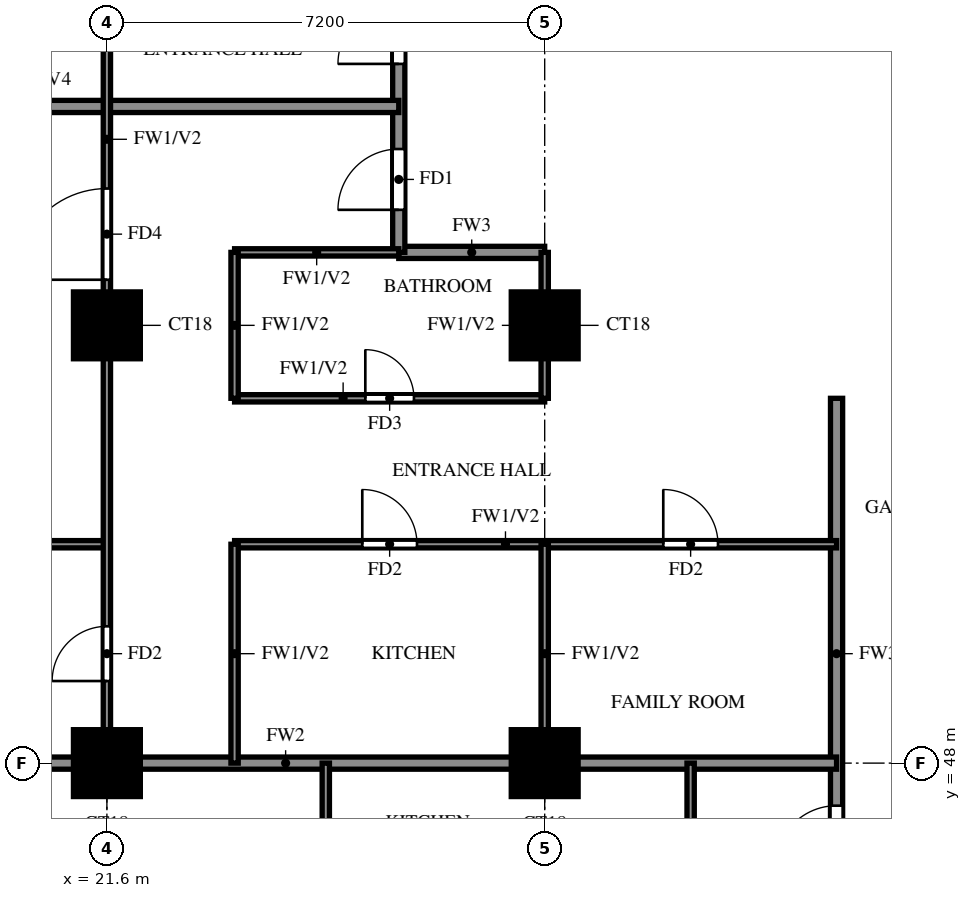
"""IFC4 building model, lengths in metres.
Left out: names, types, materials, properties, quantities, classifications, styles, units other than length and angle.
Written with IfcOpenShell. Run it as: python <this file> out.ifc"""

import sys

from ifc_helpers import new_model, si_unit, direction, frame, frame_2d, origin, origin_2d, place, context, subcontext, project, spatial, rectangle, extrude, source, transform, mapped, element, fill, save


model = new_model("IFC4")
c1 = context("Model", 3, precision=1e-05, world=origin(), true_north=direction((0.0, 1.0)))
c2 = subcontext(c1, "Body", "Model", "MODEL_VIEW")
j1 = project(units=[si_unit("LENGTHUNIT", "METRE"), si_unit("PLANEANGLEUNIT", "RADIAN")], contexts=[c1])
p1 = place(None, origin())
s1 = spatial("IfcSite", under=j1, at=p1, CompositionType="ELEMENT")
p2 = place(p1, origin())
s2 = spatial("IfcBuilding", under=s1, at=p2, CompositionType="ELEMENT")
p3 = place(p2, frame((0.0, 0.0, 130.5)))
s3 = spatial("IfcBuildingStorey", under=s2, at=p3, CompositionType="ELEMENT", Elevation=130.5)
m1 = source(origin(), c2, "Body", "SweptSolid", [
    extrude(rectangle(XDim=1.1, YDim=1.1, at=origin_2d()), origin(), (0.0, 0.0, 1.0), 3.2),
])
for number, where, z_axis, x_axis in (
    (1, (21.6, 48.0, 0.0), (0.0, 0.0, 1.0), (1.0, 0.0, 0.0)),
    (2, (28.8, 48.0, 0.0), (0.0, 0.0, 1.0), (1.0, 0.0, 0.0)),
    (3, (21.6, 55.2, 0.0), (0.0, 0.0, 1.0), (1.0, 0.0, 0.0)),
    (4, (28.8, 55.2, 0.0), (0.0, 0.0, 1.0), (1.0, 0.0, 0.0)),
):
    element("IfcColumn", number, at=place(p3, frame(where, z_axis=z_axis, x_axis=x_axis)), inside=s3, PredefinedType="COLUMN", context=c2, shape_type="MappedRepresentation", body=[
        mapped(m1, transform((0.0, 0.0, 0.0))),
    ])
p4 = place(p3, frame((26.4, 56.4, 0.0), z_axis=(0.0, 0.0, 1.0), x_axis=(1.0, 0.0, 0.0)))
e5 = element("IfcWall", 5, at=p4, inside=s3, PredefinedType="SOLIDWALL", context=c2, shape_type="SweptSolid", body=[
    extrude(rectangle(XDim=2.4, YDim=0.2, at=frame_2d((1.2, 0.0))), origin(), (0.0, 0.0, 1.0), 3.2),
])
p5 = place(p3, frame((26.4, 56.4, 0.0), z_axis=(0.0, 0.0, 1.0), x_axis=(0.0, 1.0, 0.0)))
e6 = element("IfcWall", 6, at=p5, inside=s3, PredefinedType="SOLIDWALL", context=c2, shape_type="SweptSolid", body=[
    extrude(rectangle(XDim=9.6, YDim=0.2, at=frame_2d((4.8, 0.0))), origin(), (0.0, 0.0, 1.0), 3.2),
])
p6 = place(p5, frame((0.7, 0.0, 0.0)))
e7 = element("IfcOpeningElement", 7, at=p6, cuts=e6, PredefinedType="OPENING", context=c2, shape_type="SweptSolid", body=[
    extrude(rectangle(XDim=1.0, YDim=2.1, at=frame_2d((0.5, 1.05))), frame((0.0, 0.11, 0.0), z_axis=(0.0, -1.0, 0.0), x_axis=(1.0, 0.0, 0.0)), (0.0, 0.0, 1.0), 0.22),
])
p7 = place(p5, frame((3.1, 0.0, 0.0)))
e8 = element("IfcOpeningElement", 8, at=p7, cuts=e6, PredefinedType="OPENING", context=c2, shape_type="SweptSolid", body=[
    extrude(rectangle(XDim=1.0, YDim=2.1, at=frame_2d((0.5, 1.05))), frame((0.0, 0.11, 0.0), z_axis=(0.0, -1.0, 0.0), x_axis=(1.0, 0.0, 0.0)), (0.0, 0.0, 1.0), 0.22),
])
p8 = place(p3, frame((33.6, 45.6, 0.0), z_axis=(0.0, 0.0, 1.0), x_axis=(0.0, 1.0, 0.0)))
e9 = element("IfcWall", 9, at=p8, inside=s3, PredefinedType="SOLIDWALL", context=c2, shape_type="SweptSolid", body=[
    extrude(rectangle(XDim=8.4, YDim=0.2, at=frame_2d((4.2, 0.0))), origin(), (0.0, 0.0, 1.0), 3.2),
])
p9 = place(p8, frame((0.7, 0.0, 0.0)))
e10 = element("IfcOpeningElement", 10, at=p9, cuts=e9, PredefinedType="OPENING", context=c2, shape_type="SweptSolid", body=[
    extrude(rectangle(XDim=1.0, YDim=2.1, at=frame_2d((0.5, 1.05))), frame((0.0, 0.11, 0.0), z_axis=(0.0, -1.0, 0.0), x_axis=(1.0, 0.0, 0.0)), (0.0, 0.0, 1.0), 0.22),
])
p10 = place(p3, frame((14.525, 48.0, 0.0), z_axis=(0.0, 0.0, 1.0), x_axis=(1.0, 0.0, 0.0)))
e11 = element("IfcWall", 11, at=p10, inside=s3, PredefinedType="SOLIDWALL", context=c2, shape_type="SweptSolid", body=[
    extrude(rectangle(XDim=19.075, YDim=0.2, at=frame_2d((9.538, 0.0))), origin(), (0.0, 0.0, 1.0), 3.2),
])
p11 = place(p3, frame((14.525, 58.8, 0.0), z_axis=(0.0, 0.0, 1.0), x_axis=(1.0, 0.0, 0.0)))
e12 = element("IfcWall", 12, at=p11, inside=s3, PredefinedType="SOLIDWALL", context=c2, shape_type="SweptSolid", body=[
    extrude(rectangle(XDim=11.875, YDim=0.2, at=frame_2d((5.938, 0.0))), origin(), (0.0, 0.0, 1.0), 2.3),
])
p12 = place(p3, frame((14.525, 51.6, 0.0), z_axis=(0.0, 0.0, 1.0), x_axis=(1.0, 0.0, 0.0)))
e13 = element("IfcWall", 13, at=p12, inside=s3, PredefinedType="PARTITIONING", context=c2, shape_type="SweptSolid", body=[
    extrude(rectangle(XDim=7.075, YDim=0.12, at=frame_2d((3.538, 0.0))), origin(), (0.0, 0.0, 1.0), 2.3),
])
p13 = place(p3, frame((23.7, 51.6, 0.0), z_axis=(0.0, 0.0, 1.0), x_axis=(1.0, 0.0, 0.0)))
e14 = element("IfcWall", 14, at=p13, inside=s3, PredefinedType="PARTITIONING", context=c2, shape_type="SweptSolid", body=[
    extrude(rectangle(XDim=9.9, YDim=0.12, at=frame_2d((4.95, 0.0))), origin(), (0.0, 0.0, 1.0), 3.2),
])
p14 = place(p13, frame((2.1, 0.0, 0.0)))
e15 = element("IfcOpeningElement", 15, at=p14, cuts=e14, PredefinedType="OPENING", context=c2, shape_type="SweptSolid", body=[
    extrude(rectangle(XDim=0.9, YDim=2.1, at=frame_2d((0.45, 1.05))), frame((0.0, 0.07, 0.0), z_axis=(0.0, -1.0, 0.0), x_axis=(1.0, 0.0, 0.0)), (0.0, 0.0, 1.0), 0.14),
])
p15 = place(p13, frame((7.05, 0.0, 0.0)))
e16 = element("IfcOpeningElement", 16, at=p15, cuts=e14, PredefinedType="OPENING", context=c2, shape_type="SweptSolid", body=[
    extrude(rectangle(XDim=0.9, YDim=2.1, at=frame_2d((0.45, 1.05))), frame((0.0, 0.07, 0.0), z_axis=(0.0, -1.0, 0.0), x_axis=(1.0, 0.0, 0.0)), (0.0, 0.0, 1.0), 0.14),
])
p16 = place(p3, frame((23.7, 54.0, 0.0), z_axis=(0.0, 0.0, 1.0), x_axis=(1.0, 0.0, 0.0)))
e17 = element("IfcWall", 17, at=p16, inside=s3, PredefinedType="PARTITIONING", context=c2, shape_type="SweptSolid", body=[
    extrude(rectangle(XDim=5.1, YDim=0.12, at=frame_2d((2.55, 0.0))), origin(), (0.0, 0.0, 1.0), 3.2),
])
p17 = place(p16, frame((2.15, 0.0, 0.0)))
e18 = element("IfcOpeningElement", 18, at=p17, cuts=e17, PredefinedType="OPENING", context=c2, shape_type="SweptSolid", body=[
    extrude(rectangle(XDim=0.8, YDim=2.1, at=frame_2d((0.4, 1.05))), frame((0.0, 0.07, 0.0), z_axis=(0.0, -1.0, 0.0), x_axis=(1.0, 0.0, 0.0)), (0.0, 0.0, 1.0), 0.14),
])
p18 = place(p3, frame((23.7, 56.4, 0.0), z_axis=(0.0, 0.0, 1.0), x_axis=(1.0, 0.0, 0.0)))
e19 = element("IfcWall", 19, at=p18, inside=s3, PredefinedType="PARTITIONING", context=c2, shape_type="SweptSolid", body=[
    extrude(rectangle(XDim=2.7, YDim=0.12, at=frame_2d((1.35, 0.0))), origin(), (0.0, 0.0, 1.0), 3.2),
])
p19 = place(p3, frame((21.6, 48.0, 0.0), z_axis=(0.0, 0.0, 1.0), x_axis=(0.0, 1.0, 0.0)))
e20 = element("IfcWall", 20, at=p19, inside=s3, PredefinedType="PARTITIONING", context=c2, shape_type="SweptSolid", body=[
    extrude(rectangle(XDim=21.6, YDim=0.12, at=frame_2d((10.8, 0.0))), origin(), (0.0, 0.0, 1.0), 3.2),
])
p20 = place(p19, frame((1.35, 0.0, 0.0)))
e21 = element("IfcOpeningElement", 21, at=p20, cuts=e20, PredefinedType="OPENING", context=c2, shape_type="SweptSolid", body=[
    extrude(rectangle(XDim=0.9, YDim=2.1, at=frame_2d((0.45, 1.05))), frame((0.0, 0.07, 0.0), z_axis=(0.0, -1.0, 0.0), x_axis=(1.0, 0.0, 0.0)), (0.0, 0.0, 1.0), 0.14),
])
p21 = place(p19, frame((7.95, 0.0, 0.0)))
e22 = element("IfcOpeningElement", 22, at=p21, cuts=e20, PredefinedType="OPENING", context=c2, shape_type="SweptSolid", body=[
    extrude(rectangle(XDim=1.5, YDim=2.1, at=frame_2d((0.75, 1.05))), frame((0.0, 0.07, 0.0), z_axis=(0.0, -1.0, 0.0), x_axis=(1.0, 0.0, 0.0)), (0.0, 0.0, 1.0), 0.14),
])
p22 = place(p19, frame((12.15, 0.0, 0.0)))
e23 = element("IfcOpeningElement", 23, at=p22, cuts=e20, PredefinedType="OPENING", context=c2, shape_type="SweptSolid", body=[
    extrude(rectangle(XDim=0.9, YDim=2.1, at=frame_2d((0.45, 1.05))), frame((0.0, 0.07, 0.0), z_axis=(0.0, -1.0, 0.0), x_axis=(1.0, 0.0, 0.0)), (0.0, 0.0, 1.0), 0.14),
])
p23 = place(p19, frame((17.55, 0.0, 0.0)))
e24 = element("IfcOpeningElement", 24, at=p23, cuts=e20, PredefinedType="OPENING", context=c2, shape_type="SweptSolid", body=[
    extrude(rectangle(XDim=0.9, YDim=2.1, at=frame_2d((0.45, 1.05))), frame((0.0, 0.07, 0.0), z_axis=(0.0, -1.0, 0.0), x_axis=(1.0, 0.0, 0.0)), (0.0, 0.0, 1.0), 0.14),
])
p24 = place(p3, frame((23.7, 48.0, 0.0), z_axis=(0.0, 0.0, 1.0), x_axis=(0.0, 1.0, 0.0)))
e25 = element("IfcWall", 25, at=p24, inside=s3, PredefinedType="PARTITIONING", context=c2, shape_type="SweptSolid", body=[
    extrude(rectangle(XDim=3.6, YDim=0.12, at=frame_2d((1.8, 0.0))), origin(), (0.0, 0.0, 1.0), 3.2),
])
p25 = place(p3, frame((23.7, 54.0, 0.0), z_axis=(0.0, 0.0, 1.0), x_axis=(0.0, 1.0, 0.0)))
e26 = element("IfcWall", 26, at=p25, inside=s3, PredefinedType="PARTITIONING", context=c2, shape_type="SweptSolid", body=[
    extrude(rectangle(XDim=2.4, YDim=0.12, at=frame_2d((1.2, 0.0))), origin(), (0.0, 0.0, 1.0), 3.2),
])
p26 = place(p3, frame((25.2, 39.725, 0.0), z_axis=(0.0, 0.0, 1.0), x_axis=(0.0, 1.0, 0.0)))
e27 = element("IfcWall", 27, at=p26, inside=s3, PredefinedType="PARTITIONING", context=c2, shape_type="SweptSolid", body=[
    extrude(rectangle(XDim=8.275, YDim=0.12, at=frame_2d((4.137, 0.0))), origin(), (0.0, 0.0, 1.0), 3.2),
])
p27 = place(p26, frame((4.525, 0.0, 0.0)))
e28 = element("IfcOpeningElement", 28, at=p27, cuts=e27, PredefinedType="OPENING", context=c2, shape_type="SweptSolid", body=[
    extrude(rectangle(XDim=0.9, YDim=2.1, at=frame_2d((0.45, 1.05))), frame((0.0, 0.07, 0.0), z_axis=(0.0, -1.0, 0.0), x_axis=(1.0, 0.0, 0.0)), (0.0, 0.0, 1.0), 0.14),
])
p28 = place(p3, frame((28.8, 48.0, 0.0), z_axis=(0.0, 0.0, 1.0), x_axis=(0.0, 1.0, 0.0)))
e29 = element("IfcWall", 29, at=p28, inside=s3, PredefinedType="PARTITIONING", context=c2, shape_type="SweptSolid", body=[
    extrude(rectangle(XDim=3.6, YDim=0.12, at=frame_2d((1.8, 0.0))), origin(), (0.0, 0.0, 1.0), 3.2),
])
for number, where, z_axis, x_axis in (
    (30, (28.8, 54.0, 0.0), (0.0, 0.0, 1.0), (0.0, 1.0, 0.0)),
    (31, (31.2, 45.6, 0.0), (0.0, 0.0, 1.0), (0.0, 1.0, 0.0)),
):
    element("IfcWall", number, at=place(p3, frame(where, z_axis=z_axis, x_axis=x_axis)), inside=s3, PredefinedType="PARTITIONING", context=c2, shape_type="SweptSolid", body=[
        extrude(rectangle(XDim=2.4, YDim=0.12, at=frame_2d((1.2, 0.0))), origin(), (0.0, 0.0, 1.0), 3.2),
    ])
p29 = place(p9, origin())
e32 = element("IfcDoor", 32, at=p29, inside=s3, OperationType="SINGLE_SWING_LEFT", PredefinedType="DOOR", context=c2, shape_type="SweptSolid", body=[
    extrude(rectangle(XDim=1.0, YDim=2.1, at=frame_2d((0.5, 1.05))), frame((0.0, 0.025, 0.0), z_axis=(0.0, -1.0, 0.0), x_axis=(1.0, 0.0, 0.0)), (0.0, 0.0, 1.0), 0.05),
])
fill(e10, e32)
p30 = place(p6, origin())
e33 = element("IfcDoor", 33, at=p30, inside=s3, OperationType="SINGLE_SWING_LEFT", PredefinedType="DOOR", context=c2, shape_type="SweptSolid", body=[
    extrude(rectangle(XDim=1.0, YDim=2.1, at=frame_2d((0.5, 1.05))), frame((0.0, 0.025, 0.0), z_axis=(0.0, -1.0, 0.0), x_axis=(1.0, 0.0, 0.0)), (0.0, 0.0, 1.0), 0.05),
])
fill(e7, e33)
p31 = place(p20, origin())
e34 = element("IfcDoor", 34, at=p31, inside=s3, OperationType="SINGLE_SWING_LEFT", PredefinedType="DOOR", context=c2, shape_type="SweptSolid", body=[
    extrude(rectangle(XDim=0.9, YDim=2.1, at=frame_2d((0.45, 1.05))), frame((0.0, 0.025, 0.0), z_axis=(0.0, -1.0, 0.0), x_axis=(1.0, 0.0, 0.0)), (0.0, 0.0, 1.0), 0.05),
])
fill(e21, e34)
p32 = place(p21, origin())
e35 = element("IfcDoor", 35, at=p32, inside=s3, OperationType="SINGLE_SWING_LEFT", PredefinedType="DOOR", context=c2, shape_type="SweptSolid", body=[
    extrude(rectangle(XDim=1.5, YDim=2.1, at=frame_2d((0.75, 1.05))), frame((0.0, 0.025, 0.0), z_axis=(0.0, -1.0, 0.0), x_axis=(1.0, 0.0, 0.0)), (0.0, 0.0, 1.0), 0.05),
])
fill(e22, e35)
p33 = place(p14, origin())
e36 = element("IfcDoor", 36, at=p33, inside=s3, OperationType="SINGLE_SWING_LEFT", PredefinedType="DOOR", context=c2, shape_type="SweptSolid", body=[
    extrude(rectangle(XDim=0.9, YDim=2.1, at=frame_2d((0.45, 1.05))), frame((0.0, 0.025, 0.0), z_axis=(0.0, -1.0, 0.0), x_axis=(1.0, 0.0, 0.0)), (0.0, 0.0, 1.0), 0.05),
])
fill(e15, e36)
p34 = place(p17, origin())
e37 = element("IfcDoor", 37, at=p34, inside=s3, OperationType="SINGLE_SWING_LEFT", PredefinedType="DOOR", context=c2, shape_type="SweptSolid", body=[
    extrude(rectangle(XDim=0.8, YDim=2.1, at=frame_2d((0.4, 1.05))), frame((0.0, 0.025, 0.0), z_axis=(0.0, -1.0, 0.0), x_axis=(1.0, 0.0, 0.0)), (0.0, 0.0, 1.0), 0.05),
])
fill(e18, e37)
p35 = place(p15, origin())
e38 = element("IfcDoor", 38, at=p35, inside=s3, OperationType="SINGLE_SWING_RIGHT", PredefinedType="DOOR", context=c2, shape_type="SweptSolid", body=[
    extrude(rectangle(XDim=0.9, YDim=2.1, at=frame_2d((0.45, 1.05))), frame((0.0, 0.025, 0.0), z_axis=(0.0, -1.0, 0.0), x_axis=(1.0, 0.0, 0.0)), (0.0, 0.0, 1.0), 0.05),
])
fill(e16, e38)
p36 = place(p7, origin())
e39 = element("IfcDoor", 39, at=p36, inside=s3, OperationType="SINGLE_SWING_RIGHT", PredefinedType="DOOR", context=c2, shape_type="SweptSolid", body=[
    extrude(rectangle(XDim=1.0, YDim=2.1, at=frame_2d((0.5, 1.05))), frame((0.0, 0.025, 0.0), z_axis=(0.0, -1.0, 0.0), x_axis=(1.0, 0.0, 0.0)), (0.0, 0.0, 1.0), 0.05),
])
fill(e8, e39)
save(model, sys.argv[1])
